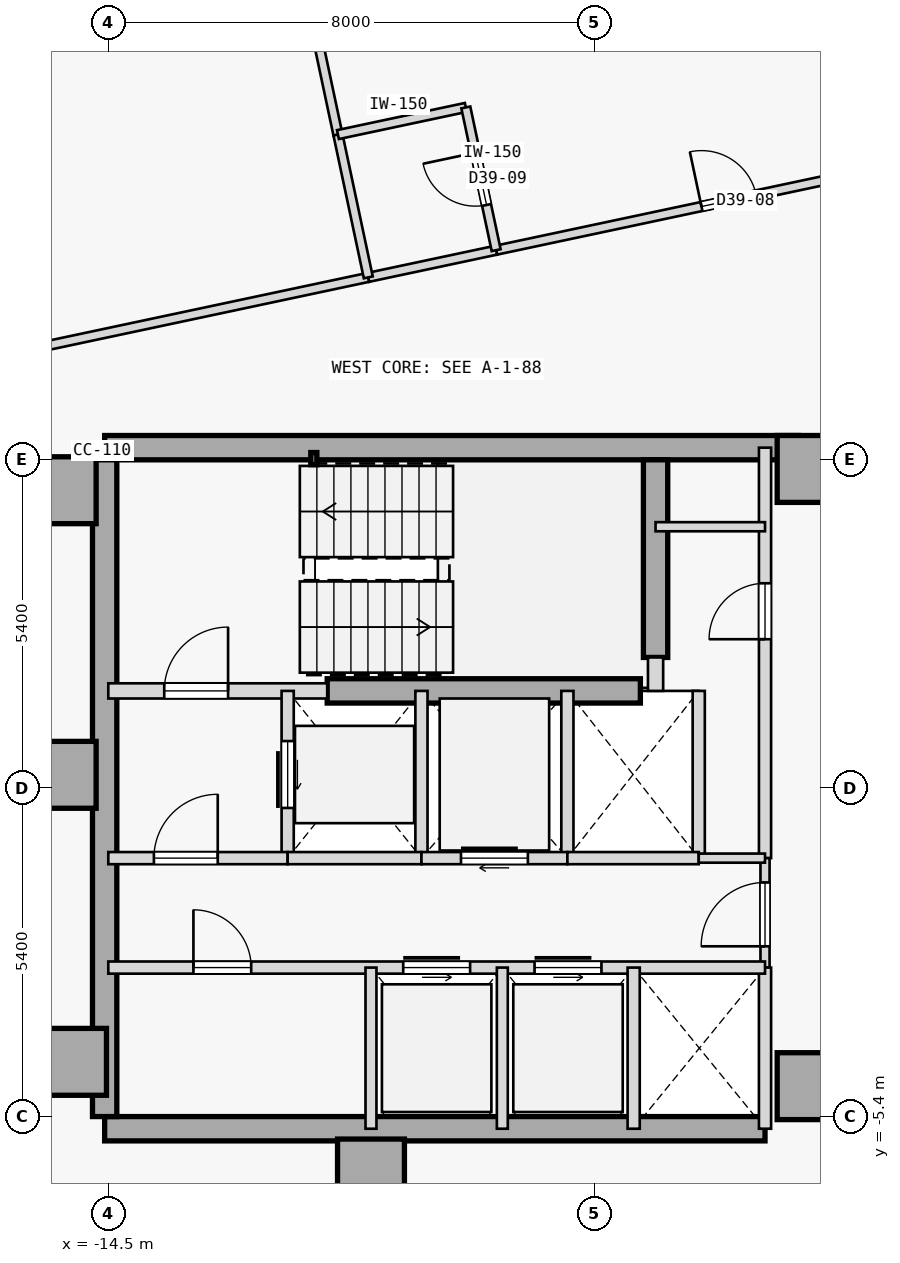
"""IFC4 building model, lengths in metres.
Left out: names, types, materials, properties, quantities, classifications, styles, units other than length and angle.
Written with IfcOpenShell. Run it as: python <this file> out.ifc"""

import sys

from ifc_helpers import new_model, si_unit, direction, frame, frame_2d, origin, origin_2d, place, context, subcontext, project, spatial, rectangle, hollow_rectangle, extrude, element, fill, save


model = new_model("IFC4")
c1 = context("Model", 3, precision=1e-05, world=origin(), true_north=direction((0.0, 1.0)))
c2 = subcontext(c1, "Body", "Model", "MODEL_VIEW")
j1 = project(units=[si_unit("LENGTHUNIT", "METRE"), si_unit("PLANEANGLEUNIT", "RADIAN")], contexts=[c1])
p1 = place(None, origin())
s1 = spatial("IfcSite", under=j1, at=p1, CompositionType="ELEMENT")
p2 = place(p1, origin())
s2 = spatial("IfcBuilding", under=s1, at=p2, CompositionType="ELEMENT")
p3 = place(p2, frame((0.0, 0.0, 154.8)))
s3 = spatial("IfcBuildingStorey", under=s2, at=p3, CompositionType="ELEMENT", Elevation=154.8)
for number, where, z_axis, x_axis in (
    (1, (-15.25, 4.9, 0.0), (0.0, 0.0, 1.0), (1.0, 0.0, 0.0)),
    (2, (-15.25, 0.22, 0.0), (0.0, 0.0, 1.0), (1.0, 0.0, 0.0)),
    (3, (-15.08, -4.5, 0.0), (0.0, 0.0, 1.0), (1.0, 0.0, 0.0)),
    (4, (-10.18, -6.32, 0.0), (0.0, 0.0, 1.0), (1.0, 0.0, 0.0)),
    (5, (-2.95, -4.9, 0.0), (0.0, 0.0, 1.0), (1.0, 0.0, 0.0)),
    (6, (-2.95, 5.25, 0.0), (0.0, 0.0, 1.0), (1.0, 0.0, 0.0)),
):
    element("IfcColumn", number, at=place(p3, frame(where, z_axis=z_axis, x_axis=x_axis)), inside=s3, PredefinedType="COLUMN", context=c2, shape_type="SweptSolid", body=[
        extrude(rectangle(XDim=1.1, YDim=1.1, at=origin_2d()), origin(), (0.0, 0.0, 1.0), 3.4),
    ])
p4 = place(p3, frame((-14.56, 5.6, 0.0), z_axis=(0.0, 0.0, 1.0), x_axis=(1.0, 0.0, 0.0)))
e7 = element("IfcWall", 7, at=p4, inside=s3, PredefinedType="SHEAR", context=c2, shape_type="SweptSolid", body=[
    extrude(rectangle(XDim=11.41, YDim=0.4, at=frame_2d((5.705, 0.0))), origin(), (0.0, 0.0, 1.0), 3.175),
])
p5 = place(p3, frame((-14.56, -5.6, 0.0), z_axis=(0.0, 0.0, 1.0), x_axis=(1.0, 0.0, 0.0)))
e8 = element("IfcWall", 8, at=p5, inside=s3, PredefinedType="SHEAR", context=c2, shape_type="SweptSolid", body=[
    extrude(rectangle(XDim=10.86, YDim=0.4, at=frame_2d((5.43, 0.0))), origin(), (0.0, 0.0, 1.0), 3.175),
])
p6 = place(p3, frame((-14.56, -5.4, 0.0), z_axis=(0.0, 0.0, 1.0), x_axis=(0.0, 1.0, 0.0)))
e9 = element("IfcWall", 9, at=p6, inside=s3, PredefinedType="SHEAR", context=c2, shape_type="SweptSolid", body=[
    extrude(rectangle(XDim=10.8, YDim=0.4, at=frame_2d((5.4, 0.0))), origin(), (0.0, 0.0, 1.0), 3.175),
])
p7 = place(p3, frame((-5.5, 2.15, 0.0), z_axis=(0.0, 0.0, 1.0), x_axis=(0.0, 1.0, 0.0)))
e10 = element("IfcWall", 10, at=p7, inside=s3, PredefinedType="SHEAR", context=c2, shape_type="SweptSolid", body=[
    extrude(rectangle(XDim=3.25, YDim=0.4, at=frame_2d((1.625, 0.0))), origin(), (0.0, 0.0, 1.0), 3.175),
])
p8 = place(p3, frame((-10.9, 1.6, 0.0), z_axis=(0.0, 0.0, 1.0), x_axis=(1.0, 0.0, 0.0)))
e11 = element("IfcWall", 11, at=p8, inside=s3, PredefinedType="SHEAR", context=c2, shape_type="SweptSolid", body=[
    extrude(rectangle(XDim=5.15, YDim=0.4, at=frame_2d((2.575, 0.0))), origin(), (0.0, 0.0, 1.0), 3.175),
])
p9 = place(p3, frame((-11.12, 5.42, 0.0), z_axis=(0.0, 0.0, 1.0), x_axis=(1.0, 0.0, 0.0)))
e12 = element("IfcColumn", 12, at=p9, inside=s3, PredefinedType="COLUMN", context=c2, shape_type="SweptSolid", body=[
    extrude(hollow_rectangle(XDim=0.1, YDim=0.2, WallThickness=0.008, at=origin_2d()), origin(), (0.0, 0.0, 1.0), 3.4),
])
p10 = place(p3, frame((-14.5, 1.6, 0.0), z_axis=(0.0, 0.0, 1.0), x_axis=(1.0, 0.0, 0.0)))
e13 = element("IfcWall", 13, at=p10, inside=s3, PredefinedType="STANDARD", context=c2, shape_type="SweptSolid", body=[
    extrude(rectangle(XDim=3.6, YDim=0.25, at=frame_2d((1.8, 0.0))), origin(), (0.0, 0.0, 1.0), 3.175),
])
p11 = place(p10, frame((0.92, 0.0, 0.0)))
e14 = element("IfcOpeningElement", 14, at=p11, cuts=e13, PredefinedType="OPENING", context=c2, shape_type="SweptSolid", body=[
    extrude(rectangle(XDim=1.05, YDim=2.15, at=frame_2d((0.525, 1.075))), frame((0.0, 0.135, 0.0), z_axis=(0.0, -1.0, 0.0), x_axis=(1.0, 0.0, 0.0)), (0.0, 0.0, 1.0), 0.27),
])
p12 = place(p3, frame((-5.5, 1.6, 0.0), z_axis=(0.0, 0.0, 1.0), x_axis=(0.0, 1.0, 0.0)))
e15 = element("IfcWall", 15, at=p12, inside=s3, PredefinedType="STANDARD", context=c2, shape_type="SweptSolid", body=[
    extrude(rectangle(XDim=0.55, YDim=0.25, at=frame_2d((0.275, 0.0))), origin(), (0.0, 0.0, 1.0), 3.175),
])
p13 = place(p3, frame((-3.7, -1.15, 0.0), z_axis=(0.0, 0.0, 1.0), x_axis=(0.0, 1.0, 0.0)))
e16 = element("IfcWall", 16, at=p13, inside=s3, PredefinedType="STANDARD", context=c2, shape_type="SweptSolid", body=[
    extrude(rectangle(XDim=6.75, YDim=0.2, at=frame_2d((3.375, 0.0))), origin(), (0.0, 0.0, 1.0), 3.175),
])
p14 = place(p13, frame((3.6, 0.0, 0.0)))
e17 = element("IfcOpeningElement", 17, at=p14, cuts=e16, PredefinedType="OPENING", context=c2, shape_type="SweptSolid", body=[
    extrude(rectangle(XDim=0.92, YDim=2.15, at=frame_2d((0.46, 1.075))), frame((0.0, 0.11, 0.0), z_axis=(0.0, -1.0, 0.0), x_axis=(1.0, 0.0, 0.0)), (0.0, 0.0, 1.0), 0.22),
])
p15 = place(p3, frame((-3.7, -2.95, 0.0), z_axis=(0.0, 0.0, 1.0), x_axis=(0.0, 1.0, 0.0)))
e18 = element("IfcWall", 18, at=p15, inside=s3, PredefinedType="PARTITIONING", context=c2, shape_type="SweptSolid", body=[
    extrude(rectangle(XDim=1.8, YDim=0.15, at=frame_2d((0.9, 0.0))), origin(), (0.0, 0.0, 1.0), 3.175),
])
p16 = place(p15, frame((0.35, 0.0, 0.0)))
e19 = element("IfcOpeningElement", 19, at=p16, cuts=e18, PredefinedType="OPENING", context=c2, shape_type="SweptSolid", body=[
    extrude(rectangle(XDim=1.05, YDim=2.18, at=frame_2d((0.525, 1.09))), frame((0.0, 0.085, 0.0), z_axis=(0.0, -1.0, 0.0), x_axis=(1.0, 0.0, 0.0)), (0.0, 0.0, 1.0), 0.17),
])
p17 = place(p3, frame((-3.7, -5.6, 0.0), z_axis=(0.0, 0.0, 1.0), x_axis=(0.0, 1.0, 0.0)))
e20 = element("IfcWall", 20, at=p17, inside=s3, PredefinedType="STANDARD", context=c2, shape_type="SweptSolid", body=[
    extrude(rectangle(XDim=2.65, YDim=0.2, at=frame_2d((1.325, 0.0))), origin(), (0.0, 0.0, 1.0), 3.175),
])
p18 = place(p3, frame((-11.55, -1.15, 0.0), z_axis=(0.0, 0.0, 1.0), x_axis=(0.0, 1.0, 0.0)))
e21 = element("IfcWall", 21, at=p18, inside=s3, PredefinedType="STANDARD", context=c2, shape_type="SweptSolid", body=[
    extrude(rectangle(XDim=2.75, YDim=0.2, at=frame_2d((1.375, 0.0))), origin(), (0.0, 0.0, 1.0), 3.175),
])
p19 = place(p18, frame((0.825, 0.0, 0.0)))
e22 = element("IfcOpeningElement", 22, at=p19, cuts=e21, PredefinedType="OPENING", context=c2, shape_type="SweptSolid", body=[
    extrude(rectangle(XDim=1.1, YDim=2.15, at=frame_2d((0.55, 1.075))), frame((0.0, 0.11, 0.0), z_axis=(0.0, -1.0, 0.0), x_axis=(1.0, 0.0, 0.0)), (0.0, 0.0, 1.0), 0.22),
])
p20 = place(p3, frame((-9.35, -1.15, 0.0), z_axis=(0.0, 0.0, 1.0), x_axis=(0.0, 1.0, 0.0)))
e23 = element("IfcWall", 23, at=p20, inside=s3, PredefinedType="STANDARD", context=c2, shape_type="SweptSolid", body=[
    extrude(rectangle(XDim=2.75, YDim=0.2, at=frame_2d((1.375, 0.0))), origin(), (0.0, 0.0, 1.0), 3.175),
])
p21 = place(p3, frame((-14.5, -1.15, 0.0), z_axis=(0.0, 0.0, 1.0), x_axis=(1.0, 0.0, 0.0)))
e24 = element("IfcWall", 24, at=p21, inside=s3, PredefinedType="STANDARD", context=c2, shape_type="SweptSolid", body=[
    extrude(rectangle(XDim=2.95, YDim=0.2, at=frame_2d((1.475, 0.0))), origin(), (0.0, 0.0, 1.0), 3.175),
])
p22 = place(p21, frame((0.75, 0.0, 0.0)))
e25 = element("IfcOpeningElement", 25, at=p22, cuts=e24, PredefinedType="OPENING", context=c2, shape_type="SweptSolid", body=[
    extrude(rectangle(XDim=1.05, YDim=2.18, at=frame_2d((0.525, 1.09))), frame((0.0, 0.11, 0.0), z_axis=(0.0, -1.0, 0.0), x_axis=(1.0, 0.0, 0.0)), (0.0, 0.0, 1.0), 0.22),
])
p23 = place(p3, frame((-11.55, -1.15, 0.0), z_axis=(0.0, 0.0, 1.0), x_axis=(1.0, 0.0, 0.0)))
e26 = element("IfcWall", 26, at=p23, inside=s3, PredefinedType="STANDARD", context=c2, shape_type="SweptSolid", body=[
    extrude(rectangle(XDim=2.2, YDim=0.2, at=frame_2d((1.1, 0.0))), origin(), (0.0, 0.0, 1.0), 3.175),
])
p24 = place(p3, frame((-6.95, -1.15, 0.0), z_axis=(0.0, 0.0, 1.0), x_axis=(0.0, 1.0, 0.0)))
e27 = element("IfcWall", 27, at=p24, inside=s3, PredefinedType="STANDARD", context=c2, shape_type="SweptSolid", body=[
    extrude(rectangle(XDim=2.75, YDim=0.2, at=frame_2d((1.375, 0.0))), origin(), (0.0, 0.0, 1.0), 3.175),
])
p25 = place(p3, frame((-9.35, -1.15, 0.0), z_axis=(0.0, 0.0, 1.0), x_axis=(1.0, 0.0, 0.0)))
e28 = element("IfcWall", 28, at=p25, inside=s3, PredefinedType="STANDARD", context=c2, shape_type="SweptSolid", body=[
    extrude(rectangle(XDim=2.4, YDim=0.2, at=frame_2d((1.2, 0.0))), origin(), (0.0, 0.0, 1.0), 3.175),
])
p26 = place(p25, frame((0.65, 0.0, 0.0)))
e29 = element("IfcOpeningElement", 29, at=p26, cuts=e28, PredefinedType="OPENING", context=c2, shape_type="SweptSolid", body=[
    extrude(rectangle(XDim=1.1, YDim=2.15, at=frame_2d((0.55, 1.075))), frame((0.0, 0.11, 0.0), z_axis=(0.0, -1.0, 0.0), x_axis=(1.0, 0.0, 0.0)), (0.0, 0.0, 1.0), 0.22),
])
p27 = place(p3, frame((-4.79, -1.15, 0.0), z_axis=(0.0, 0.0, 1.0), x_axis=(0.0, 1.0, 0.0)))
e30 = element("IfcWall", 30, at=p27, inside=s3, PredefinedType="STANDARD", context=c2, shape_type="SweptSolid", body=[
    extrude(rectangle(XDim=2.75, YDim=0.2, at=frame_2d((1.375, 0.0))), origin(), (0.0, 0.0, 1.0), 3.175),
])
p28 = place(p3, frame((-6.95, -1.15, 0.0), z_axis=(0.0, 0.0, 1.0), x_axis=(1.0, 0.0, 0.0)))
e31 = element("IfcWall", 31, at=p28, inside=s3, PredefinedType="STANDARD", context=c2, shape_type="SweptSolid", body=[
    extrude(rectangle(XDim=2.16, YDim=0.2, at=frame_2d((1.08, 0.0))), origin(), (0.0, 0.0, 1.0), 3.175),
])
p29 = place(p3, frame((-4.79, -1.15, 0.0), z_axis=(0.0, 0.0, 1.0), x_axis=(1.0, 0.0, 0.0)))
e32 = element("IfcWall", 32, at=p29, inside=s3, PredefinedType="PARTITIONING", context=c2, shape_type="SweptSolid", body=[
    extrude(rectangle(XDim=1.09, YDim=0.15, at=frame_2d((0.545, 0.0))), origin(), (0.0, 0.0, 1.0), 3.175),
])
p30 = place(p3, frame((-14.5, -2.95, 0.0), z_axis=(0.0, 0.0, 1.0), x_axis=(1.0, 0.0, 0.0)))
e33 = element("IfcWall", 33, at=p30, inside=s3, PredefinedType="STANDARD", context=c2, shape_type="SweptSolid", body=[
    extrude(rectangle(XDim=10.8, YDim=0.2, at=frame_2d((5.4, 0.0))), origin(), (0.0, 0.0, 1.0), 3.175),
])
p31 = place(p30, frame((4.85, 0.0, 0.0)))
e34 = element("IfcOpeningElement", 34, at=p31, cuts=e33, PredefinedType="OPENING", context=c2, shape_type="SweptSolid", body=[
    extrude(rectangle(XDim=1.1, YDim=2.15, at=frame_2d((0.55, 1.075))), frame((0.0, 0.11, 0.0), z_axis=(0.0, -1.0, 0.0), x_axis=(1.0, 0.0, 0.0)), (0.0, 0.0, 1.0), 0.22),
])
p32 = place(p30, frame((7.01, 0.0, 0.0)))
e35 = element("IfcOpeningElement", 35, at=p32, cuts=e33, PredefinedType="OPENING", context=c2, shape_type="SweptSolid", body=[
    extrude(rectangle(XDim=1.1, YDim=2.15, at=frame_2d((0.55, 1.075))), frame((0.0, 0.11, 0.0), z_axis=(0.0, -1.0, 0.0), x_axis=(1.0, 0.0, 0.0)), (0.0, 0.0, 1.0), 0.22),
])
p33 = place(p30, frame((1.4, 0.0, 0.0)))
e36 = element("IfcOpeningElement", 36, at=p33, cuts=e33, PredefinedType="OPENING", context=c2, shape_type="SweptSolid", body=[
    extrude(rectangle(XDim=0.95, YDim=2.15, at=frame_2d((0.475, 1.075))), frame((0.0, 0.11, 0.0), z_axis=(0.0, -1.0, 0.0), x_axis=(1.0, 0.0, 0.0)), (0.0, 0.0, 1.0), 0.22),
])
p34 = place(p3, frame((-5.86, -5.6, 0.0), z_axis=(0.0, 0.0, 1.0), x_axis=(0.0, 1.0, 0.0)))
e37 = element("IfcWall", 37, at=p34, inside=s3, PredefinedType="STANDARD", context=c2, shape_type="SweptSolid", body=[
    extrude(rectangle(XDim=2.65, YDim=0.2, at=frame_2d((1.325, 0.0))), origin(), (0.0, 0.0, 1.0), 3.175),
])
for number, where, z_axis, x_axis in (
    (38, (-10.18, -5.6, 0.0), (0.0, 0.0, 1.0), (0.0, 1.0, 0.0)),
    (39, (-8.02, -5.6, 0.0), (0.0, 0.0, 1.0), (0.0, 1.0, 0.0)),
):
    element("IfcWall", number, at=place(p3, frame(where, z_axis=z_axis, x_axis=x_axis)), inside=s3, PredefinedType="STANDARD", context=c2, shape_type="SweptSolid", body=[
        extrude(rectangle(XDim=2.65, YDim=0.18, at=frame_2d((1.325, 0.0))), origin(), (0.0, 0.0, 1.0), 3.175),
    ])
p35 = place(p3, frame((-5.5, 4.3, 0.0), z_axis=(0.0, 0.0, 1.0), x_axis=(1.0, 0.0, 0.0)))
e40 = element("IfcWall", 40, at=p35, inside=s3, PredefinedType="PARTITIONING", context=c2, shape_type="SweptSolid", body=[
    extrude(rectangle(XDim=1.8, YDim=0.15, at=frame_2d((0.9, 0.0))), origin(), (0.0, 0.0, 1.0), 3.175),
])
p36 = place(p3, frame((-17.162, 6.926, 0.0), z_axis=(0.0, 0.0, 1.0), x_axis=(0.978143627193, 0.207930383978, 0.0)))
e41 = element("IfcWall", 41, at=p36, inside=s3, PredefinedType="PARTITIONING", context=c2, shape_type="SweptSolid", body=[
    extrude(rectangle(XDim=7.093, YDim=0.15, at=frame_2d((3.546, 0.0))), origin(), (0.0, 0.0, 1.0), 3.175),
])
p37 = place(p3, frame((-8.121, 8.848, 0.0), z_axis=(0.0, 0.0, 1.0), x_axis=(0.978146318695, 0.207917722244, 0.0)))
e42 = element("IfcWall", 42, at=p37, inside=s3, PredefinedType="PARTITIONING", context=c2, shape_type="SweptSolid", body=[
    extrude(rectangle(XDim=7.824, YDim=0.15, at=frame_2d((3.912, 0.0))), origin(), (0.0, 0.0, 1.0), 3.175),
])
p38 = place(p37, frame((3.452, 0.0, 0.0)))
e43 = element("IfcOpeningElement", 43, at=p38, cuts=e42, PredefinedType="OPENING", context=c2, shape_type="SweptSolid", body=[
    extrude(rectangle(XDim=0.92, YDim=2.15, at=frame_2d((0.46, 1.075))), frame((0.0, 0.085, 0.0), z_axis=(0.0, -1.0, 0.0), x_axis=(1.0, 0.0, 0.0)), (0.0, 0.0, 1.0), 0.17),
])
p39 = place(p3, frame((-10.224, 8.401, 0.0), z_axis=(0.0, 0.0, 1.0), x_axis=(0.978146728319, 0.207915795165, 0.0)))
e44 = element("IfcWall", 44, at=p39, inside=s3, PredefinedType="PARTITIONING", context=c2, shape_type="SweptSolid", body=[
    extrude(rectangle(XDim=2.15, YDim=0.15, at=frame_2d((1.075, 0.0))), origin(), (0.0, 0.0, 1.0), 3.175),
])
p40 = place(p3, frame((-10.723, 10.748, 0.0), z_axis=(0.0, 0.0, 1.0), x_axis=(-0.207914988081, 0.978146899873, 0.0)))
e45 = element("IfcWall", 45, at=p40, inside=s3, PredefinedType="PARTITIONING", context=c2, shape_type="SweptSolid", body=[
    extrude(rectangle(XDim=11.995, YDim=0.15, at=frame_2d((5.998, 0.0))), origin(), (0.0, 0.0, 1.0), 3.175),
])
p41 = place(p3, frame((-10.224, 8.401, 0.0), z_axis=(0.0, 0.0, 1.0), x_axis=(-0.207917150959, 0.978146440129, 0.0)))
e46 = element("IfcWall", 46, at=p41, inside=s3, PredefinedType="PARTITIONING", context=c2, shape_type="SweptSolid", body=[
    extrude(rectangle(XDim=2.4, YDim=0.15, at=frame_2d((1.2, 0.0))), origin(), (0.0, 0.0, 1.0), 3.175),
])
p42 = place(p3, frame((-10.723, 10.748, 0.0), z_axis=(0.0, 0.0, 1.0), x_axis=(0.978146728319, 0.207915795165, 0.0)))
e47 = element("IfcWall", 47, at=p42, inside=s3, PredefinedType="PARTITIONING", context=c2, shape_type="SweptSolid", body=[
    extrude(rectangle(XDim=2.15, YDim=0.15, at=frame_2d((1.075, 0.0))), origin(), (0.0, 0.0, 1.0), 3.175),
])
p43 = place(p3, frame((-8.121, 8.848, 0.0), z_axis=(0.0, 0.0, 1.0), x_axis=(-0.207917150959, 0.978146440129, 0.0)))
e48 = element("IfcWall", 48, at=p43, inside=s3, PredefinedType="PARTITIONING", context=c2, shape_type="SweptSolid", body=[
    extrude(rectangle(XDim=2.4, YDim=0.15, at=frame_2d((1.2, 0.0))), origin(), (0.0, 0.0, 1.0), 3.175),
])
p44 = place(p43, frame((0.76, 0.0, 0.0)))
e49 = element("IfcOpeningElement", 49, at=p44, cuts=e48, PredefinedType="OPENING", context=c2, shape_type="SweptSolid", body=[
    extrude(rectangle(XDim=0.88, YDim=2.15, at=frame_2d((0.44, 1.075))), frame((0.0, 0.085, 0.0), z_axis=(0.0, -1.0, 0.0), x_axis=(1.0, 0.0, 0.0)), (0.0, 0.0, 1.0), 0.17),
])
p45 = place(p11, origin())
e50 = element("IfcDoor", 50, at=p45, inside=s3, OperationType="SINGLE_SWING_RIGHT", PredefinedType="DOOR", context=c2, shape_type="SweptSolid", body=[
    extrude(rectangle(XDim=1.05, YDim=2.15, at=frame_2d((0.525, 1.075))), frame((0.0, 0.025, 0.0), z_axis=(0.0, -1.0, 0.0), x_axis=(1.0, 0.0, 0.0)), (0.0, 0.0, 1.0), 0.05),
])
fill(e14, e50)
p46 = place(p22, origin())
e51 = element("IfcDoor", 51, at=p46, inside=s3, OperationType="SINGLE_SWING_RIGHT", PredefinedType="DOOR", context=c2, shape_type="SweptSolid", body=[
    extrude(rectangle(XDim=1.05, YDim=2.18, at=frame_2d((0.525, 1.09))), frame((0.0, 0.025, 0.0), z_axis=(0.0, -1.0, 0.0), x_axis=(1.0, 0.0, 0.0)), (0.0, 0.0, 1.0), 0.05),
])
fill(e25, e51)
p47 = place(p16, origin())
e52 = element("IfcDoor", 52, at=p47, inside=s3, OperationType="SINGLE_SWING_LEFT", PredefinedType="DOOR", context=c2, shape_type="SweptSolid", body=[
    extrude(rectangle(XDim=1.05, YDim=2.18, at=frame_2d((0.525, 1.09))), frame((0.0, 0.025, 0.0), z_axis=(0.0, -1.0, 0.0), x_axis=(1.0, 0.0, 0.0)), (0.0, 0.0, 1.0), 0.05),
])
fill(e19, e52)
p48 = place(p19, origin())
e53 = element("IfcDoor", 53, at=p48, inside=s3, OperationType="SLIDING_TO_RIGHT", PredefinedType="DOOR", context=c2, shape_type="SweptSolid", body=[
    extrude(rectangle(XDim=1.1, YDim=2.15, at=frame_2d((0.55, 1.075))), frame((0.0, 0.025, 0.0), z_axis=(0.0, -1.0, 0.0), x_axis=(1.0, 0.0, 0.0)), (0.0, 0.0, 1.0), 0.05),
])
fill(e22, e53)
p49 = place(p26, origin())
e54 = element("IfcDoor", 54, at=p49, inside=s3, OperationType="SLIDING_TO_RIGHT", PredefinedType="DOOR", context=c2, shape_type="SweptSolid", body=[
    extrude(rectangle(XDim=1.1, YDim=2.15, at=frame_2d((0.55, 1.075))), frame((0.0, 0.025, 0.0), z_axis=(0.0, -1.0, 0.0), x_axis=(1.0, 0.0, 0.0)), (0.0, 0.0, 1.0), 0.05),
])
fill(e29, e54)
p50 = place(p31, origin())
e55 = element("IfcDoor", 55, at=p50, inside=s3, OperationType="SLIDING_TO_LEFT", PredefinedType="DOOR", context=c2, shape_type="SweptSolid", body=[
    extrude(rectangle(XDim=1.1, YDim=2.15, at=frame_2d((0.55, 1.075))), frame((0.0, 0.025, 0.0), z_axis=(0.0, -1.0, 0.0), x_axis=(1.0, 0.0, 0.0)), (0.0, 0.0, 1.0), 0.05),
])
fill(e34, e55)
p51 = place(p32, origin())
e56 = element("IfcDoor", 56, at=p51, inside=s3, OperationType="SLIDING_TO_LEFT", PredefinedType="DOOR", context=c2, shape_type="SweptSolid", body=[
    extrude(rectangle(XDim=1.1, YDim=2.15, at=frame_2d((0.55, 1.075))), frame((0.0, 0.025, 0.0), z_axis=(0.0, -1.0, 0.0), x_axis=(1.0, 0.0, 0.0)), (0.0, 0.0, 1.0), 0.05),
])
fill(e35, e56)
p52 = place(p33, origin())
e57 = element("IfcDoor", 57, at=p52, inside=s3, OperationType="SINGLE_SWING_LEFT", PredefinedType="DOOR", context=c2, shape_type="SweptSolid", body=[
    extrude(rectangle(XDim=0.95, YDim=2.15, at=frame_2d((0.475, 1.075))), frame((0.0, 0.025, 0.0), z_axis=(0.0, -1.0, 0.0), x_axis=(1.0, 0.0, 0.0)), (0.0, 0.0, 1.0), 0.05),
])
fill(e36, e57)
p53 = place(p14, origin())
e58 = element("IfcDoor", 58, at=p53, inside=s3, OperationType="SINGLE_SWING_LEFT", PredefinedType="DOOR", context=c2, shape_type="SweptSolid", body=[
    extrude(rectangle(XDim=0.92, YDim=2.15, at=frame_2d((0.46, 1.075))), frame((0.0, 0.025, 0.0), z_axis=(0.0, -1.0, 0.0), x_axis=(1.0, 0.0, 0.0)), (0.0, 0.0, 1.0), 0.05),
])
fill(e17, e58)
p54 = place(p38, origin())
e59 = element("IfcDoor", 59, at=p54, inside=s3, OperationType="SINGLE_SWING_LEFT", PredefinedType="DOOR", context=c2, shape_type="SweptSolid", body=[
    extrude(rectangle(XDim=0.92, YDim=2.15, at=frame_2d((0.46, 1.075))), frame((0.0, 0.025, 0.0), z_axis=(0.0, -1.0, 0.0), x_axis=(1.0, 0.0, 0.0)), (0.0, 0.0, 1.0), 0.05),
])
fill(e43, e59)
p55 = place(p44, origin())
e60 = element("IfcDoor", 60, at=p55, inside=s3, OperationType="SINGLE_SWING_RIGHT", PredefinedType="DOOR", context=c2, shape_type="SweptSolid", body=[
    extrude(rectangle(XDim=0.88, YDim=2.15, at=frame_2d((0.44, 1.075))), frame((0.0, 0.025, 0.0), z_axis=(0.0, -1.0, 0.0), x_axis=(1.0, 0.0, 0.0)), (0.0, 0.0, 1.0), 0.05),
])
fill(e49, e60)
save(model, sys.argv[1])
